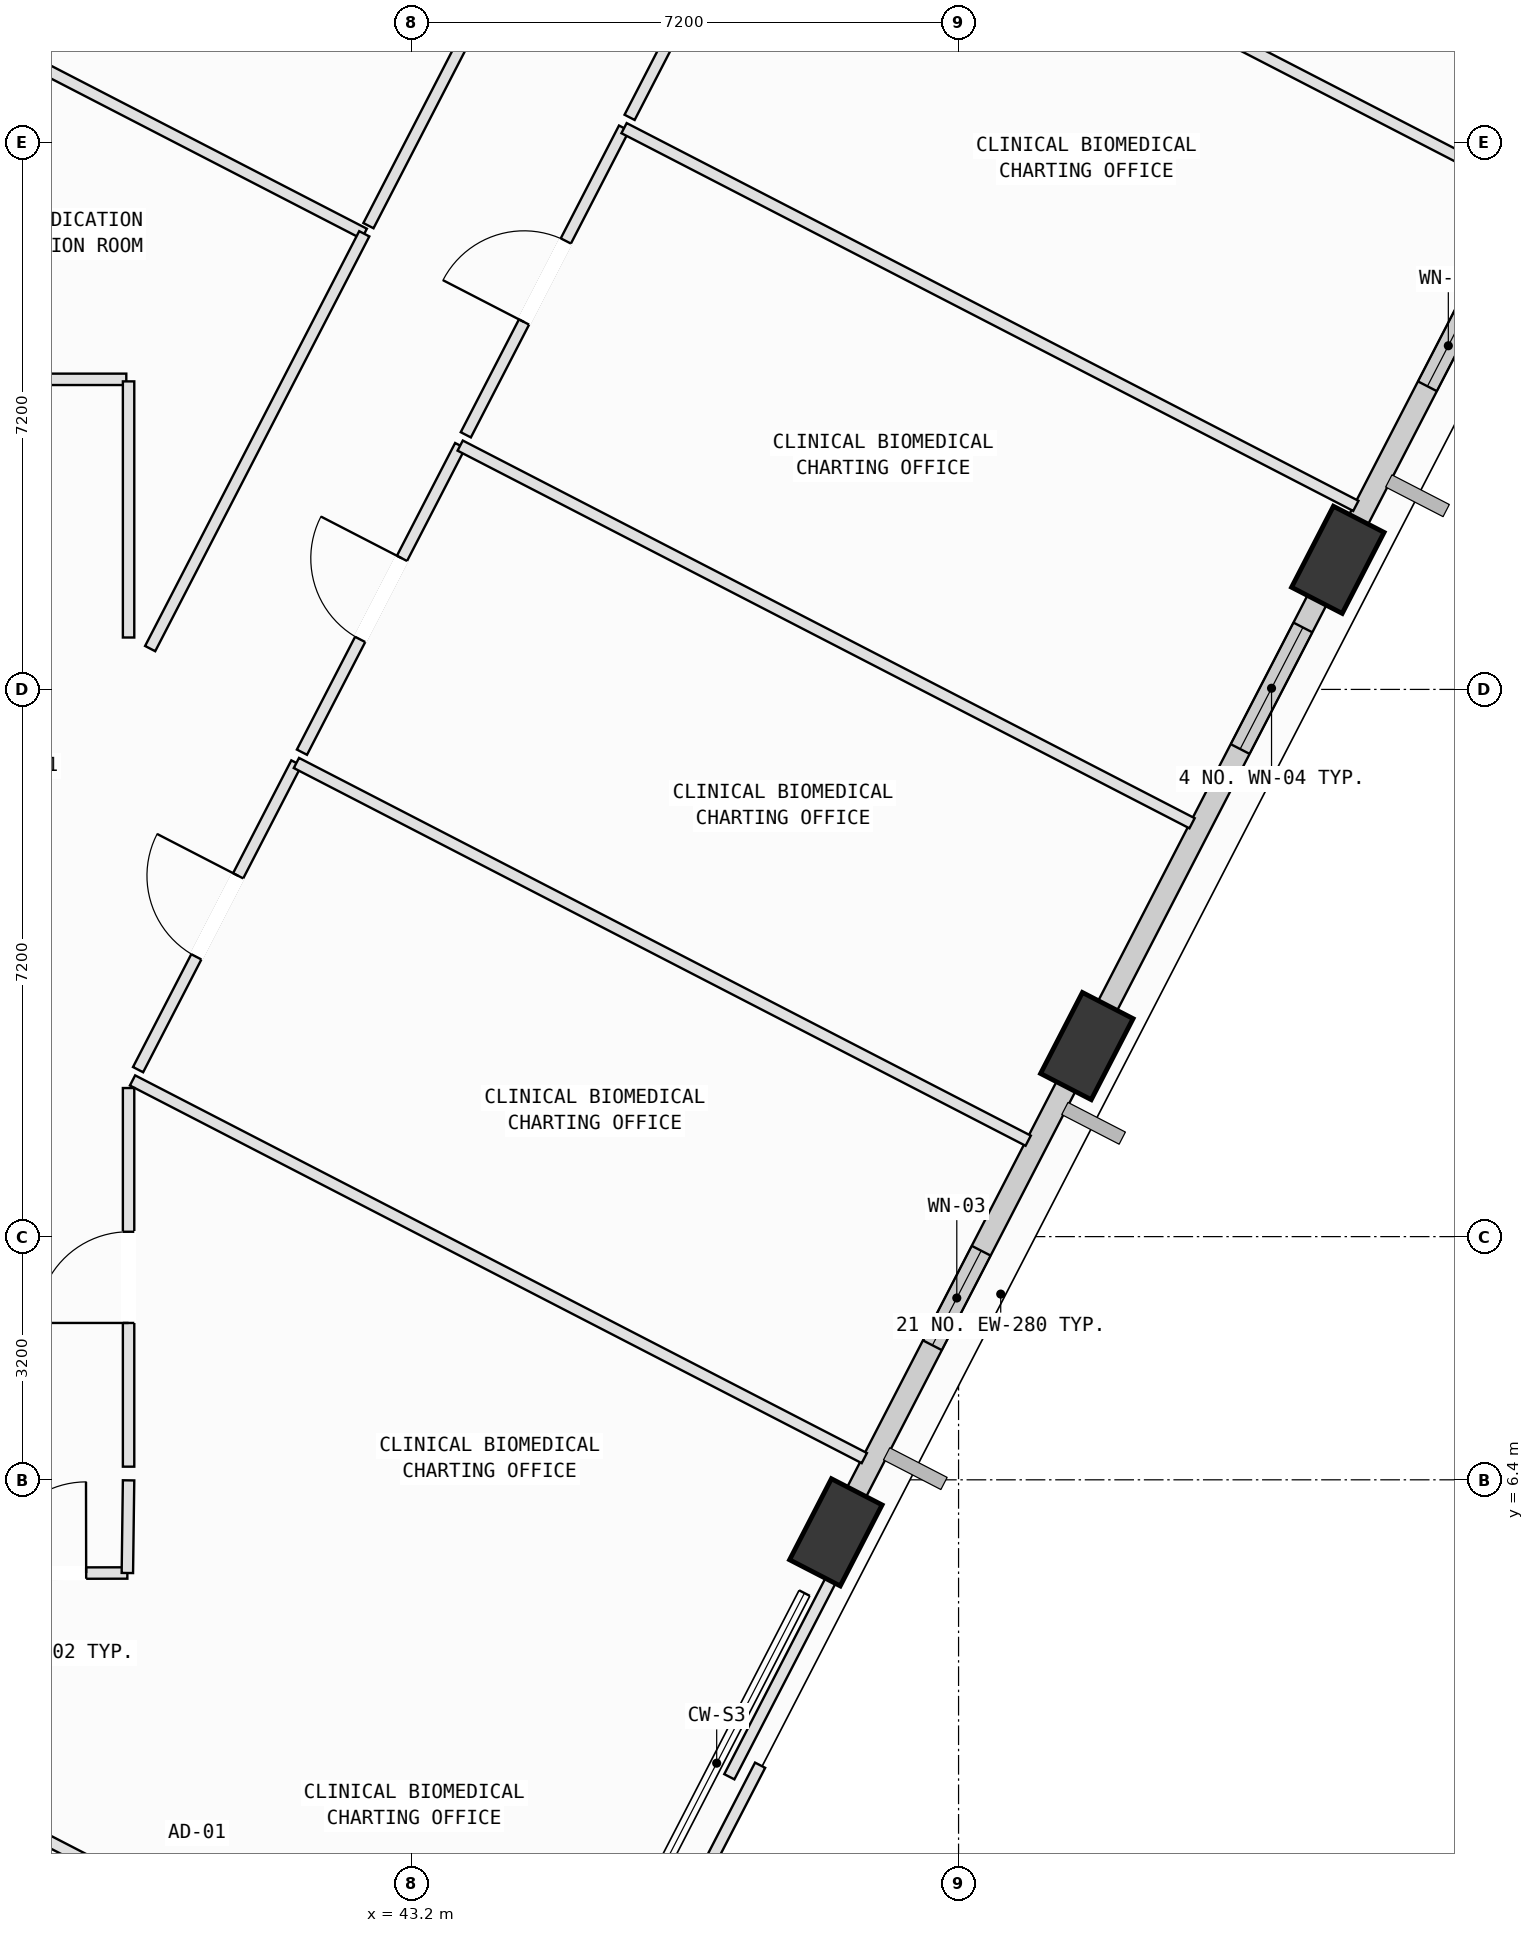
"""IFC4 building model, lengths in metres.
Left out: names, types, materials, properties, quantities, classifications, styles, units other than length and angle.
Written with IfcOpenShell. Run it as: python <this file> out.ifc"""

import sys

from ifc_helpers import new_model, si_unit, direction, frame, frame_2d, origin, origin_2d, place, context, subcontext, project, spatial, rectangle, extrude, element, fill, save


model = new_model("IFC4")
c1 = context("Model", 3, precision=1e-05, world=origin(), true_north=direction((0.0, 1.0)))
c2 = subcontext(c1, "Body", "Model", "MODEL_VIEW")
j1 = project(units=[si_unit("LENGTHUNIT", "METRE"), si_unit("PLANEANGLEUNIT", "RADIAN")], contexts=[c1])
p1 = place(None, origin())
s1 = spatial("IfcSite", under=j1, at=p1, CompositionType="ELEMENT")
p2 = place(p1, origin())
s2 = spatial("IfcBuilding", under=s1, at=p2, CompositionType="ELEMENT")
p3 = place(p2, frame((0.0, 0.0, 292.6)))
s3 = spatial("IfcBuildingStorey", under=s2, at=p3, CompositionType="ELEMENT", Elevation=292.6)
p4 = place(p3, frame((48.785, 5.709, 0.002), z_axis=(0.078225272526, 0.063273122532, 0.994925785525), x_axis=(-0.975830382164, -0.19940357382, 0.089405145225)))
e1 = element("IfcColumn", 1, at=p4, inside=s3, PredefinedType="COLUMN", context=c2, shape_type="SweptSolid", body=[
    extrude(rectangle(XDim=1.2, YDim=0.75, at=origin_2d()), origin(), (0.0, 0.0, 1.0), 4.017),
])
p5 = place(p3, frame((52.088, 12.107, 0.002), z_axis=(0.051765437966, 0.076705308196, 0.995709111702), x_axis=(-0.875129587478, -0.476850316831, 0.082231262048)))
e2 = element("IfcColumn", 2, at=p5, inside=s3, PredefinedType="COLUMN", context=c2, shape_type="SweptSolid", body=[
    extrude(rectangle(XDim=1.2, YDim=0.75, at=origin_2d()), origin(), (0.0, 0.0, 1.0), 4.014),
])
p6 = place(p3, frame((55.39, 18.505, 0.002), z_axis=(0.025241482781, 0.090139463812, 0.995609232887), x_axis=(-0.680227026132, -0.728266544912, 0.083180721816)))
e3 = element("IfcColumn", 3, at=p6, inside=s3, PredefinedType="COLUMN", context=c2, shape_type="SweptSolid", body=[
    extrude(rectangle(XDim=1.2, YDim=0.75, at=origin_2d()), origin(), (0.0, 0.0, 1.0), 4.014),
])
p7 = place(p3, frame((51.99, 11.918, 0.0), z_axis=(0.0, 0.0, 1.0), x_axis=(-0.45864291977, -0.888620657055, 0.0)))
e4 = element("IfcWall", 4, at=p7, inside=s3, PredefinedType="SOLIDWALL", context=c2, shape_type="SweptSolid", body=[
    extrude(rectangle(XDim=6.413, YDim=0.28, at=frame_2d((3.207, 0.0))), origin(), (0.0, 0.0, 1.0), 3.265),
])
p8 = place(p7, frame((2.818, 0.0, 0.75)))
e5 = element("IfcOpeningElement", 5, at=p8, cuts=e4, PredefinedType="OPENING", context=c2, shape_type="SweptSolid", body=[
    extrude(rectangle(XDim=1.4, YDim=1.85, at=frame_2d((0.7, 0.925))), frame((0.0, 0.15, 0.0), z_axis=(0.0, -1.0, 0.0), x_axis=(1.0, 0.0, 0.0)), (0.0, 0.0, 1.0), 0.3),
])
p9 = place(p3, frame((55.293, 18.317, 0.0), z_axis=(0.0, 0.0, 1.0), x_axis=(-0.458654567853, -0.888614645045, 0.0)))
e6 = element("IfcWall", 6, at=p9, inside=s3, PredefinedType="SOLIDWALL", context=c2, shape_type="SweptSolid", body=[
    extrude(rectangle(XDim=6.407, YDim=0.28, at=frame_2d((3.203, 0.0))), origin(), (0.0, 0.0, 1.0), 3.265),
])
p10 = place(p9, frame((0.79, 0.0, 0.75)))
e7 = element("IfcOpeningElement", 7, at=p10, cuts=e6, PredefinedType="OPENING", context=c2, shape_type="SweptSolid", body=[
    extrude(rectangle(XDim=1.8, YDim=2.05, at=frame_2d((0.9, 1.025))), frame((0.0, 0.15, 0.0), z_axis=(0.0, -1.0, 0.0), x_axis=(1.0, 0.0, 0.0)), (0.0, 0.0, 1.0), 0.3),
])
p11 = place(p3, frame((58.6, 24.724, 0.0), z_axis=(0.0, 0.0, 1.0), x_axis=(-0.458648733121, -0.888617656592, 0.0)))
e8 = element("IfcWall", 8, at=p11, inside=s3, PredefinedType="SOLIDWALL", context=c2, shape_type="SweptSolid", body=[
    extrude(rectangle(XDim=6.418, YDim=0.28, at=frame_2d((3.209, 0.0))), origin(), (0.0, 0.0, 1.0), 3.265),
])
p12 = place(p11, frame((3.228, 0.0, 0.75)))
e9 = element("IfcOpeningElement", 9, at=p12, cuts=e8, PredefinedType="OPENING", context=c2, shape_type="SweptSolid", body=[
    extrude(rectangle(XDim=1.2, YDim=1.75, at=frame_2d((0.6, 0.875))), frame((0.0, 0.15, 0.0), z_axis=(0.0, -1.0, 0.0), x_axis=(1.0, 0.0, 0.0)), (0.0, 0.0, 1.0), 0.3),
])
p13 = place(p3, frame((35.221, 3.302, 0.0), z_axis=(0.0, 0.0, 1.0), x_axis=(0.888635172548, -0.45861479491, 0.0)))
e10 = element("IfcWall", 10, at=p13, inside=s3, PredefinedType="PARTITIONING", context=c2, shape_type="SweptSolid", body=[
    extrude(rectangle(XDim=10.835, YDim=0.15, at=frame_2d((5.417, 0.0))), origin(), (0.0, 0.0, 1.0), 3.78),
])
p14 = place(p13, frame((4.987, 0.0, 0.0)))
e11 = element("IfcOpeningElement", 11, at=p14, cuts=e10, PredefinedType="OPENING", context=c2, shape_type="SweptSolid", body=[
    extrude(rectangle(XDim=0.86, YDim=2.06, at=frame_2d((0.43, 1.03))), frame((0.0, 0.085, 0.0), z_axis=(0.0, -1.0, 0.0), x_axis=(1.0, 0.0, 0.0)), (0.0, 0.0, 1.0), 0.17),
])
p15 = place(p3, frame((37.18, 5.17, 0.0), z_axis=(0.0, 0.0, 1.0), x_axis=(0.999998349231, 0.001817012819, 0.0)))
e12 = element("IfcWall", 12, at=p15, inside=s3, PredefinedType="PARTITIONING", context=c2, shape_type="SweptSolid", body=[
    extrude(rectangle(XDim=2.284, YDim=0.15, at=frame_2d((1.142, 0.0))), origin(), (0.0, 0.0, 1.0), 3.78),
])
p16 = place(p15, frame((0.542, 0.0, 0.0)))
e13 = element("IfcOpeningElement", 13, at=p16, cuts=e12, PredefinedType="OPENING", context=c2, shape_type="SweptSolid", body=[
    extrude(rectangle(XDim=1.2, YDim=2.15, at=frame_2d((0.6, 1.075))), frame((0.0, 0.085, 0.0), z_axis=(0.0, -1.0, 0.0), x_axis=(1.0, 0.0, 0.0)), (0.0, 0.0, 1.0), 0.17),
])
p17 = place(p3, frame((39.464, 5.174, 0.0), z_axis=(0.0, 0.0, 1.0), x_axis=(0.013017122529, 0.999915273671, 0.0)))
e14 = element("IfcWall", 14, at=p17, inside=s3, PredefinedType="PARTITIONING", context=c2, shape_type="SweptSolid", body=[
    extrude(rectangle(XDim=1.219, YDim=0.15, at=frame_2d((0.609, 0.0))), origin(), (0.0, 0.0, 1.0), 3.78),
])
p18 = place(p3, frame((39.532, 11.655, 0.0), z_axis=(0.0, 0.0, 1.0), x_axis=(0.888630433089, -0.458623978209, 0.0)))
e15 = element("IfcWall", 15, at=p18, inside=s3, PredefinedType="PARTITIONING", context=c2, shape_type="SweptSolid", body=[
    extrude(rectangle(XDim=10.834, YDim=0.15, at=frame_2d((5.417, 0.0))), origin(), (0.0, 0.0, 1.0), 3.78),
])
p19 = place(p3, frame((49.253, 6.114, 0.0), z_axis=(0.0, 0.0, 1.0), x_axis=(-0.458632236852, -0.888626170738, 0.0)))
e16 = element("IfcWall", 16, at=p19, inside=s3, PredefinedType="PARTITIONING", context=c2, shape_type="SweptSolid", body=[
    extrude(rectangle(XDim=4.075, YDim=0.15, at=frame_2d((2.038, 0.0))), origin(), (0.0, 0.0, 1.0), 3.265),
])
p20 = place(p3, frame((39.48, 6.573, 0.0), z_axis=(0.0, 0.0, 1.0), x_axis=(0.0, 1.0, 0.0)))
e17 = element("IfcWall", 17, at=p20, inside=s3, PredefinedType="PARTITIONING", context=c2, shape_type="SweptSolid", body=[
    extrude(rectangle(XDim=4.982, YDim=0.15, at=frame_2d((2.491, 0.0))), origin(), (0.0, 0.0, 1.0), 3.78),
])
p21 = place(p20, frame((1.891, 0.0, 0.0)))
e18 = element("IfcOpeningElement", 18, at=p21, cuts=e17, PredefinedType="OPENING", context=c2, shape_type="SweptSolid", body=[
    extrude(rectangle(XDim=1.2, YDim=2.15, at=frame_2d((0.6, 1.075))), frame((0.0, 0.085, 0.0), z_axis=(0.0, -1.0, 0.0), x_axis=(1.0, 0.0, 0.0)), (0.0, 0.0, 1.0), 0.17),
])
p22 = place(p3, frame((39.605, 11.797, 0.0), z_axis=(0.0, 0.0, 1.0), x_axis=(0.458725089839, 0.888578241885, 0.0)))
e19 = element("IfcWall", 19, at=p22, inside=s3, PredefinedType="PARTITIONING", context=c2, shape_type="SweptSolid", body=[
    extrude(rectangle(XDim=4.541, YDim=0.15, at=frame_2d((2.271, 0.0))), origin(), (0.0, 0.0, 1.0), 3.78),
])
p23 = place(p22, frame((1.67, 0.0, 0.0)))
e20 = element("IfcOpeningElement", 20, at=p23, cuts=e19, PredefinedType="OPENING", context=c2, shape_type="SweptSolid", body=[
    extrude(rectangle(XDim=1.2, YDim=2.15, at=frame_2d((0.6, 1.075))), frame((0.0, 0.085, 0.0), z_axis=(0.0, -1.0, 0.0), x_axis=(1.0, 0.0, 0.0)), (0.0, 0.0, 1.0), 0.17),
])
p24 = place(p3, frame((41.688, 15.832, 0.0), z_axis=(0.0, 0.0, 1.0), x_axis=(0.888593697923, -0.458695149321, 0.0)))
e21 = element("IfcWall", 21, at=p24, inside=s3, PredefinedType="PARTITIONING", context=c2, shape_type="SweptSolid", body=[
    extrude(rectangle(XDim=10.835, YDim=0.15, at=frame_2d((5.417, 0.0))), origin(), (0.0, 0.0, 1.0), 3.78),
])
p25 = place(p3, frame((41.761, 15.974, 0.0), z_axis=(0.0, 0.0, 1.0), x_axis=(0.45864291977, 0.888620657055, 0.0)))
e22 = element("IfcWall", 22, at=p25, inside=s3, PredefinedType="PARTITIONING", context=c2, shape_type="SweptSolid", body=[
    extrude(rectangle(XDim=4.54, YDim=0.15, at=frame_2d((2.27, 0.0))), origin(), (0.0, 0.0, 1.0), 3.78),
])
p26 = place(p25, frame((1.67, 0.0, 0.0)))
e23 = element("IfcOpeningElement", 23, at=p26, cuts=e22, PredefinedType="OPENING", context=c2, shape_type="SweptSolid", body=[
    extrude(rectangle(XDim=1.2, YDim=2.15, at=frame_2d((0.6, 1.075))), frame((0.0, 0.085, 0.0), z_axis=(0.0, -1.0, 0.0), x_axis=(1.0, 0.0, 0.0)), (0.0, 0.0, 1.0), 0.17),
])
p27 = place(p3, frame((43.843, 20.008, 0.0), z_axis=(0.0, 0.0, 1.0), x_axis=(0.888649389218, -0.458587246926, 0.0)))
e24 = element("IfcWall", 24, at=p27, inside=s3, PredefinedType="PARTITIONING", context=c2, shape_type="SweptSolid", body=[
    extrude(rectangle(XDim=10.835, YDim=0.15, at=frame_2d((5.418, 0.0))), origin(), (0.0, 0.0, 1.0), 3.78),
])
p28 = place(p3, frame((52.559, 12.518, 0.0), z_axis=(0.0, 0.0, 1.0), x_axis=(-0.458744801223, -0.888568065682, 0.0)))
e25 = element("IfcWall", 25, at=p28, inside=s3, PredefinedType="PARTITIONING", context=c2, shape_type="SweptSolid", body=[
    extrude(rectangle(XDim=0.793, YDim=0.15, at=frame_2d((0.397, 0.0))), origin(), (0.0, 0.0, 1.0), 3.265),
])
p29 = place(p3, frame((43.917, 20.15, 0.0), z_axis=(0.0, 0.0, 1.0), x_axis=(0.458533348006, 0.888677201669, 0.0)))
e26 = element("IfcWall", 26, at=p29, inside=s3, PredefinedType="PARTITIONING", context=c2, shape_type="SweptSolid", body=[
    extrude(rectangle(XDim=4.541, YDim=0.15, at=frame_2d((2.27, 0.0))), origin(), (0.0, 0.0, 1.0), 3.78),
])
p30 = place(p29, frame((1.67, 0.0, 0.0)))
e27 = element("IfcOpeningElement", 27, at=p30, cuts=e26, PredefinedType="OPENING", context=c2, shape_type="SweptSolid", body=[
    extrude(rectangle(XDim=1.2, YDim=2.15, at=frame_2d((0.6, 1.075))), frame((0.0, 0.085, 0.0), z_axis=(0.0, -1.0, 0.0), x_axis=(1.0, 0.0, 0.0)), (0.0, 0.0, 1.0), 0.17),
])
p31 = place(p3, frame((45.999, 24.185, 0.0), z_axis=(0.0, 0.0, 1.0), x_axis=(0.888593697923, -0.458695149321, 0.0)))
e28 = element("IfcWall", 28, at=p31, inside=s3, PredefinedType="PARTITIONING", context=c2, shape_type="SweptSolid", body=[
    extrude(rectangle(XDim=10.835, YDim=0.15, at=frame_2d((5.417, 0.0))), origin(), (0.0, 0.0, 1.0), 3.78),
])
p32 = place(p3, frame((55.86, 18.915, 0.0), z_axis=(0.0, 0.0, 1.0), x_axis=(-0.458273916957, -0.888811013116, 0.0)))
e29 = element("IfcWall", 29, at=p32, inside=s3, PredefinedType="PARTITIONING", context=c2, shape_type="SweptSolid", body=[
    extrude(rectangle(XDim=0.792, YDim=0.15, at=frame_2d((0.396, 0.0))), origin(), (0.0, 0.0, 1.0), 3.265),
])
p33 = place(p3, frame((46.072, 24.327, 0.0), z_axis=(0.0, 0.0, 1.0), x_axis=(0.458621001786, 0.888631969221, 0.0)))
e30 = element("IfcWall", 30, at=p33, inside=s3, PredefinedType="PARTITIONING", context=c2, shape_type="SweptSolid", body=[
    extrude(rectangle(XDim=4.54, YDim=0.15, at=frame_2d((2.27, 0.0))), origin(), (0.0, 0.0, 1.0), 3.78),
])
p34 = place(p33, frame((1.67, 0.0, 0.0)))
e31 = element("IfcOpeningElement", 31, at=p34, cuts=e30, PredefinedType="OPENING", context=c2, shape_type="SweptSolid", body=[
    extrude(rectangle(XDim=1.2, YDim=2.15, at=frame_2d((0.6, 1.075))), frame((0.0, 0.085, 0.0), z_axis=(0.0, -1.0, 0.0), x_axis=(1.0, 0.0, 0.0)), (0.0, 0.0, 1.0), 0.17),
])
p35 = place(p3, frame((48.154, 28.361, 0.0), z_axis=(0.0, 0.0, 1.0), x_axis=(0.888649389218, -0.458587246926, 0.0)))
e32 = element("IfcWall", 32, at=p35, inside=s3, PredefinedType="PARTITIONING", context=c2, shape_type="SweptSolid", body=[
    extrude(rectangle(XDim=10.835, YDim=0.15, at=frame_2d((5.418, 0.0))), origin(), (0.0, 0.0, 1.0), 3.78),
])
p36 = place(p3, frame((39.45, 20.88, 0.0), z_axis=(0.0, 0.0, 1.0), x_axis=(-1.0, 0.0, 0.0)))
e33 = element("IfcWall", 33, at=p36, inside=s3, PredefinedType="PARTITIONING", context=c2, shape_type="SweptSolid", body=[
    extrude(rectangle(XDim=6.225, YDim=0.15, at=frame_2d((3.112, 0.0))), origin(), (0.0, 0.0, 1.0), 3.415),
])
p37 = place(p36, frame((2.512, 0.0, 0.0)))
e34 = element("IfcOpeningElement", 34, at=p37, cuts=e33, PredefinedType="OPENING", context=c2, shape_type="SweptSolid", body=[
    extrude(rectangle(XDim=1.2, YDim=2.15, at=frame_2d((0.6, 1.075))), frame((0.0, 0.085, 0.0), z_axis=(0.0, -1.0, 0.0), x_axis=(1.0, 0.0, 0.0)), (0.0, 0.0, 1.0), 0.17),
])
p38 = place(p3, frame((35.974, 26.205, 0.0), z_axis=(0.0, 0.0, 1.0), x_axis=(0.888613749746, -0.458656302433, 0.0)))
e35 = element("IfcWall", 35, at=p38, inside=s3, PredefinedType="PARTITIONING", context=c2, shape_type="SweptSolid", body=[
    extrude(rectangle(XDim=7.435, YDim=0.15, at=frame_2d((3.718, 0.0))), origin(), (0.0, 0.0, 1.0), 3.78),
])
p39 = place(p3, frame((42.581, 22.795, 0.0), z_axis=(0.0, 0.0, 1.0), x_axis=(-0.45865608207, -0.888613863486, 0.0)))
e36 = element("IfcWall", 36, at=p39, inside=s3, PredefinedType="PARTITIONING", context=c2, shape_type="SweptSolid", body=[
    extrude(rectangle(XDim=6.142, YDim=0.15, at=frame_2d((3.071, 0.0))), origin(), (0.0, 0.0, 1.0), 3.78),
])
p40 = place(p3, frame((39.48, 17.483, 0.0), z_axis=(0.0, 0.0, 1.0), x_axis=(0.0, 1.0, 0.0)))
e37 = element("IfcWall", 37, at=p40, inside=s3, PredefinedType="PARTITIONING", context=c2, shape_type="SweptSolid", body=[
    extrude(rectangle(XDim=3.37, YDim=0.15, at=frame_2d((1.685, 0.0))), origin(), (0.0, 0.0, 1.0), 3.78),
])
p41 = place(p3, frame((45.604, 28.653, 0.0), z_axis=(0.0, 0.0, 1.0), x_axis=(-0.458615052494, -0.888635039612, 0.0)))
e38 = element("IfcWall", 38, at=p41, inside=s3, PredefinedType="PARTITIONING", context=c2, shape_type="SweptSolid", body=[
    extrude(rectangle(XDim=6.472, YDim=0.15, at=frame_2d((3.236, 0.0))), origin(), (0.0, 0.0, 1.0), 3.78),
])
p42 = place(p41, frame((2.776, 0.0, 0.0)))
e39 = element("IfcOpeningElement", 39, at=p42, cuts=e38, PredefinedType="OPENING", context=c2, shape_type="SweptSolid", body=[
    extrude(rectangle(XDim=0.92, YDim=2.1, at=frame_2d((0.46, 1.05))), frame((0.0, 0.085, 0.0), z_axis=(0.0, -1.0, 0.0), x_axis=(1.0, 0.0, 0.0)), (0.0, 0.0, 1.0), 0.17),
])
p43 = place(p3, frame((47.789, 2.645, 0.0), z_axis=(0.0, 0.0, 1.0), x_axis=(-0.458629859984, -0.888627397468, 0.0)))
e40 = element("IfcWall", 40, at=p43, inside=s3, PredefinedType="PARTITIONING", context=c2, shape_type="SweptSolid", body=[
    extrude(rectangle(XDim=6.19, YDim=0.15, at=frame_2d((3.095, 0.0))), origin(), (0.0, 0.0, 1.0), 3.265),
])
p44 = place(p8, origin())
e41 = element("IfcWindow", 41, at=p44, inside=s3, PartitioningType="SINGLE_PANEL", PredefinedType="WINDOW", context=c2, shape_type="SweptSolid", body=[
    extrude(rectangle(XDim=1.4, YDim=1.85, at=frame_2d((0.7, 0.925))), frame((0.0, 0.03, 0.0), z_axis=(0.0, -1.0, 0.0), x_axis=(1.0, 0.0, 0.0)), (0.0, 0.0, 1.0), 0.06),
])
fill(e5, e41)
p45 = place(p10, origin())
e42 = element("IfcWindow", 42, at=p45, inside=s3, PartitioningType="SINGLE_PANEL", PredefinedType="WINDOW", context=c2, shape_type="SweptSolid", body=[
    extrude(rectangle(XDim=1.8, YDim=2.05, at=frame_2d((0.9, 1.025))), frame((0.0, 0.03, 0.0), z_axis=(0.0, -1.0, 0.0), x_axis=(1.0, 0.0, 0.0)), (0.0, 0.0, 1.0), 0.06),
])
fill(e7, e42)
p46 = place(p12, origin())
e43 = element("IfcWindow", 43, at=p46, inside=s3, PartitioningType="SINGLE_PANEL", PredefinedType="WINDOW", context=c2, shape_type="SweptSolid", body=[
    extrude(rectangle(XDim=1.2, YDim=1.75, at=frame_2d((0.6, 0.875))), frame((0.0, 0.03, 0.0), z_axis=(0.0, -1.0, 0.0), x_axis=(1.0, 0.0, 0.0)), (0.0, 0.0, 1.0), 0.06),
])
fill(e9, e43)
p47 = place(p16, origin())
e44 = element("IfcDoor", 44, at=p47, inside=s3, OperationType="SINGLE_SWING_RIGHT", PredefinedType="DOOR", context=c2, shape_type="SweptSolid", body=[
    extrude(rectangle(XDim=1.2, YDim=2.15, at=frame_2d((0.6, 1.075))), frame((0.0, 0.025, 0.0), z_axis=(0.0, -1.0, 0.0), x_axis=(1.0, 0.0, 0.0)), (0.0, 0.0, 1.0), 0.05),
])
fill(e13, e44)
p48 = place(p21, origin())
e45 = element("IfcDoor", 45, at=p48, inside=s3, OperationType="SINGLE_SWING_LEFT", PredefinedType="DOOR", context=c2, shape_type="SweptSolid", body=[
    extrude(rectangle(XDim=1.2, YDim=2.15, at=frame_2d((0.6, 1.075))), frame((0.0, 0.025, 0.0), z_axis=(0.0, -1.0, 0.0), x_axis=(1.0, 0.0, 0.0)), (0.0, 0.0, 1.0), 0.05),
])
fill(e18, e45)
p49 = place(p23, origin())
e46 = element("IfcDoor", 46, at=p49, inside=s3, OperationType="SINGLE_SWING_RIGHT", PredefinedType="DOOR", context=c2, shape_type="SweptSolid", body=[
    extrude(rectangle(XDim=1.2, YDim=2.15, at=frame_2d((0.6, 1.075))), frame((0.0, 0.025, 0.0), z_axis=(0.0, -1.0, 0.0), x_axis=(1.0, 0.0, 0.0)), (0.0, 0.0, 1.0), 0.05),
])
fill(e20, e46)
p50 = place(p26, origin())
e47 = element("IfcDoor", 47, at=p50, inside=s3, OperationType="SINGLE_SWING_RIGHT", PredefinedType="DOOR", context=c2, shape_type="SweptSolid", body=[
    extrude(rectangle(XDim=1.2, YDim=2.15, at=frame_2d((0.6, 1.075))), frame((0.0, 0.025, 0.0), z_axis=(0.0, -1.0, 0.0), x_axis=(1.0, 0.0, 0.0)), (0.0, 0.0, 1.0), 0.05),
])
fill(e23, e47)
p51 = place(p30, origin())
e48 = element("IfcDoor", 48, at=p51, inside=s3, OperationType="SINGLE_SWING_LEFT", PredefinedType="DOOR", context=c2, shape_type="SweptSolid", body=[
    extrude(rectangle(XDim=1.2, YDim=2.15, at=frame_2d((0.6, 1.075))), frame((0.0, 0.025, 0.0), z_axis=(0.0, -1.0, 0.0), x_axis=(1.0, 0.0, 0.0)), (0.0, 0.0, 1.0), 0.05),
])
fill(e27, e48)
save(model, sys.argv[1])
